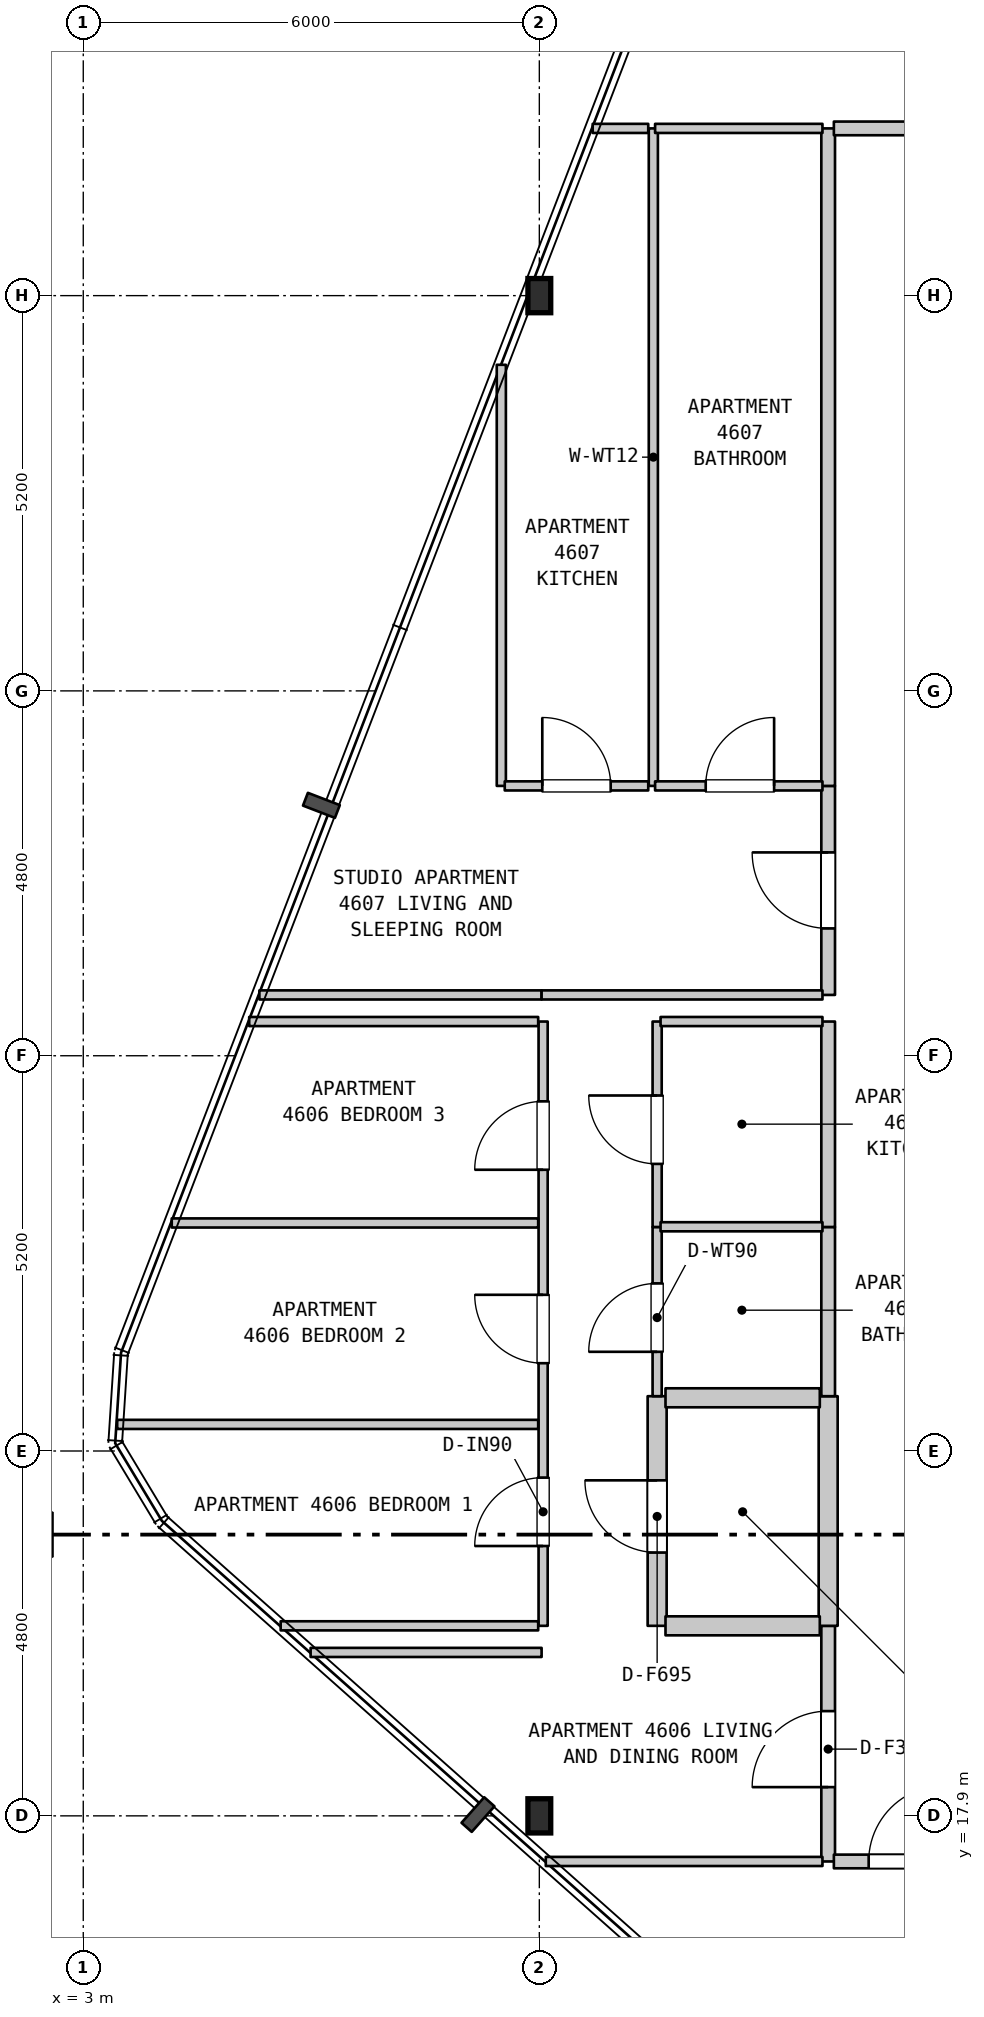
"""IFC4 building model, lengths in metres.
Left out: names, types, materials, properties, quantities, classifications, styles, units other than length and angle.
Written with IfcOpenShell. Run it as: python <this file> out.ifc"""

import sys

from ifc_helpers import new_model, si_unit, direction, frame, frame_2d, origin, origin_2d, place, context, subcontext, project, spatial, rectangle, i_section, extrude, element, fill, save


model = new_model("IFC4")
c1 = context("Model", 3, precision=1e-05, world=origin(), true_north=direction((0.0, 1.0)))
c2 = subcontext(c1, "Body", "Model", "MODEL_VIEW")
j1 = project(units=[si_unit("LENGTHUNIT", "METRE"), si_unit("PLANEANGLEUNIT", "RADIAN")], contexts=[c1])
p1 = place(None, origin())
s1 = spatial("IfcSite", under=j1, at=p1, CompositionType="ELEMENT")
p2 = place(p1, origin())
s2 = spatial("IfcBuilding", under=s1, at=p2, CompositionType="ELEMENT")
p3 = place(p2, frame((0.0, 0.0, 188.4)))
s3 = spatial("IfcBuildingStorey", under=s2, at=p3, CompositionType="ELEMENT", Elevation=188.4)
for number, where, z_axis, x_axis in (
    (1, (9.0, 17.9, 0.0), (0.0, 0.0, 1.0), (1.0, 0.0, 0.0)),
    (2, (9.0, 37.9, 0.0), (0.0, 0.0, 1.0), (1.0, 0.0, 0.0)),
):
    element("IfcColumn", number, at=place(p3, frame(where, z_axis=z_axis, x_axis=x_axis)), inside=s3, PredefinedType="COLUMN", context=c2, shape_type="SweptSolid", body=[
        extrude(i_section(OverallWidth=0.3, OverallDepth=0.45, WebThickness=0.014, FlangeThickness=0.026, FilletRadius=0.027, at=origin_2d()), origin(), (0.0, 0.0, 1.0), 3.7),
    ])
p4 = place(p3, frame((8.5, 31.45, 0.0), z_axis=(0.0, 0.0, 1.0), x_axis=(0.0, 1.0, 0.0)))
e3 = element("IfcWall", 3, at=p4, inside=s3, PredefinedType="PARTITIONING", context=c2, shape_type="SweptSolid", body=[
    extrude(rectangle(XDim=5.54, YDim=0.12, at=frame_2d((2.77, 0.0))), origin(), (0.0, 0.0, 1.0), 3.39),
])
p5 = place(p3, frame((9.05, 20.4, 0.0), z_axis=(0.0, 0.0, 1.0), x_axis=(0.0, 1.0, 0.0)))
e4 = element("IfcWall", 4, at=p5, inside=s3, PredefinedType="PARTITIONING", context=c2, shape_type="SweptSolid", body=[
    extrude(rectangle(XDim=7.95, YDim=0.12, at=frame_2d((3.975, 0.0))), origin(), (0.0, 0.0, 1.0), 2.79),
])
p6 = place(p5, frame((1.05, 0.0, 0.0)))
e5 = element("IfcOpeningElement", 5, at=p6, cuts=e4, PredefinedType="OPENING", context=c2, shape_type="SweptSolid", body=[
    extrude(rectangle(XDim=0.9, YDim=2.15, at=frame_2d((0.45, 1.075))), frame((0.0, 0.07, 0.0), z_axis=(0.0, -1.0, 0.0), x_axis=(1.0, 0.0, 0.0)), (0.0, 0.0, 1.0), 0.14),
])
p7 = place(p5, frame((3.455, 0.0, 0.0)))
e6 = element("IfcOpeningElement", 6, at=p7, cuts=e4, PredefinedType="OPENING", context=c2, shape_type="SweptSolid", body=[
    extrude(rectangle(XDim=0.9, YDim=2.15, at=frame_2d((0.45, 1.075))), frame((0.0, 0.07, 0.0), z_axis=(0.0, -1.0, 0.0), x_axis=(1.0, 0.0, 0.0)), (0.0, 0.0, 1.0), 0.14),
])
p8 = place(p5, frame((6.0, 0.0, 0.0)))
e7 = element("IfcOpeningElement", 7, at=p8, cuts=e4, PredefinedType="OPENING", context=c2, shape_type="SweptSolid", body=[
    extrude(rectangle(XDim=0.9, YDim=2.15, at=frame_2d((0.45, 1.075))), frame((0.0, 0.07, 0.0), z_axis=(0.0, -1.0, 0.0), x_axis=(1.0, 0.0, 0.0)), (0.0, 0.0, 1.0), 0.14),
])
p9 = place(p3, frame((10.5, 31.45, 0.0), z_axis=(0.0, 0.0, 1.0), x_axis=(0.0, 1.0, 0.0)))
e8 = element("IfcWall", 8, at=p9, inside=s3, PredefinedType="PARTITIONING", context=c2, shape_type="SweptSolid", body=[
    extrude(rectangle(XDim=8.65, YDim=0.12, at=frame_2d((4.325, 0.0))), origin(), (0.0, 0.0, 1.0), 3.39),
])
p10 = place(p3, frame((10.55, 20.4, 0.0), z_axis=(0.0, 0.0, 1.0), x_axis=(0.0, 1.0, 0.0)))
e9 = element("IfcWall", 9, at=p10, inside=s3, PredefinedType="STANDARD", context=c2, shape_type="SweptSolid", body=[
    extrude(rectangle(XDim=3.021, YDim=0.25, at=frame_2d((1.51, 0.0))), origin(), (0.0, 0.0, 1.0), 3.39),
])
p11 = place(p10, frame((0.964, 0.0, 0.0)))
e10 = element("IfcOpeningElement", 10, at=p11, cuts=e9, PredefinedType="OPENING", context=c2, shape_type="SweptSolid", body=[
    extrude(rectangle(XDim=0.95, YDim=2.15, at=frame_2d((0.475, 1.075))), frame((0.0, 0.135, 0.0), z_axis=(0.0, -1.0, 0.0), x_axis=(1.0, 0.0, 0.0)), (0.0, 0.0, 1.0), 0.27),
])
p12 = place(p3, frame((10.55, 23.421, 0.0), z_axis=(0.0, 0.0, 1.0), x_axis=(0.0, 1.0, 0.0)))
e11 = element("IfcWall", 11, at=p12, inside=s3, PredefinedType="PARTITIONING", context=c2, shape_type="SweptSolid", body=[
    extrude(rectangle(XDim=2.226, YDim=0.12, at=frame_2d((1.113, 0.0))), origin(), (0.0, 0.0, 1.0), 3.39),
])
p13 = place(p12, frame((0.584, 0.0, 0.0)))
e12 = element("IfcOpeningElement", 12, at=p13, cuts=e11, PredefinedType="OPENING", context=c2, shape_type="SweptSolid", body=[
    extrude(rectangle(XDim=0.9, YDim=2.1, at=frame_2d((0.45, 1.05))), frame((0.0, 0.07, 0.0), z_axis=(0.0, -1.0, 0.0), x_axis=(1.0, 0.0, 0.0)), (0.0, 0.0, 1.0), 0.14),
])
p14 = place(p3, frame((10.55, 25.647, 0.0), z_axis=(0.0, 0.0, 1.0), x_axis=(0.0, 1.0, 0.0)))
e13 = element("IfcWall", 13, at=p14, inside=s3, PredefinedType="PARTITIONING", context=c2, shape_type="SweptSolid", body=[
    extrude(rectangle(XDim=2.703, YDim=0.12, at=frame_2d((1.352, 0.0))), origin(), (0.0, 0.0, 1.0), 3.39),
])
p15 = place(p14, frame((0.83, 0.0, 0.0)))
e14 = element("IfcOpeningElement", 14, at=p15, cuts=e13, PredefinedType="OPENING", context=c2, shape_type="SweptSolid", body=[
    extrude(rectangle(XDim=0.9, YDim=2.15, at=frame_2d((0.45, 1.075))), frame((0.0, 0.07, 0.0), z_axis=(0.0, -1.0, 0.0), x_axis=(1.0, 0.0, 0.0)), (0.0, 0.0, 1.0), 0.14),
])
p16 = place(p3, frame((12.8, 17.3, 0.0), z_axis=(0.0, 0.0, 1.0), x_axis=(0.0, 1.0, 0.0)))
e15 = element("IfcWall", 15, at=p16, inside=s3, PredefinedType="STANDARD", context=c2, shape_type="SweptSolid", body=[
    extrude(rectangle(XDim=3.1, YDim=0.18, at=frame_2d((1.55, 0.0))), origin(), (0.0, 0.0, 1.0), 3.39),
])
p17 = place(p16, frame((0.978, 0.0, 0.0)))
e16 = element("IfcOpeningElement", 16, at=p17, cuts=e15, PredefinedType="OPENING", context=c2, shape_type="SweptSolid", body=[
    extrude(rectangle(XDim=1.0, YDim=2.15, at=frame_2d((0.5, 1.075))), frame((0.0, 0.1, 0.0), z_axis=(0.0, -1.0, 0.0), x_axis=(1.0, 0.0, 0.0)), (0.0, 0.0, 1.0), 0.2),
])
p18 = place(p3, frame((12.8, 20.4, 0.0), z_axis=(0.0, 0.0, 1.0), x_axis=(0.0, 1.0, 0.0)))
e17 = element("IfcWall", 17, at=p18, inside=s3, PredefinedType="STANDARD", context=c2, shape_type="SweptSolid", body=[
    extrude(rectangle(XDim=3.021, YDim=0.25, at=frame_2d((1.51, 0.0))), origin(), (0.0, 0.0, 1.0), 3.39),
])
p19 = place(p3, frame((12.8, 23.421, 0.0), z_axis=(0.0, 0.0, 1.0), x_axis=(0.0, 1.0, 0.0)))
e18 = element("IfcWall", 18, at=p19, inside=s3, PredefinedType="STANDARD", context=c2, shape_type="SweptSolid", body=[
    extrude(rectangle(XDim=2.226, YDim=0.18, at=frame_2d((1.113, 0.0))), origin(), (0.0, 0.0, 1.0), 3.39),
])
p20 = place(p3, frame((12.8, 25.647, 0.0), z_axis=(0.0, 0.0, 1.0), x_axis=(0.0, 1.0, 0.0)))
e19 = element("IfcWall", 19, at=p20, inside=s3, PredefinedType="STANDARD", context=c2, shape_type="SweptSolid", body=[
    extrude(rectangle(XDim=2.703, YDim=0.18, at=frame_2d((1.352, 0.0))), origin(), (0.0, 0.0, 1.0), 3.39),
])
p21 = place(p3, frame((12.8, 28.7, 0.0), z_axis=(0.0, 0.0, 1.0), x_axis=(0.0, 1.0, 0.0)))
e20 = element("IfcWall", 20, at=p21, inside=s3, PredefinedType="STANDARD", context=c2, shape_type="SweptSolid", body=[
    extrude(rectangle(XDim=2.75, YDim=0.18, at=frame_2d((1.375, 0.0))), origin(), (0.0, 0.0, 1.0), 3.39),
])
p22 = place(p21, frame((0.875, 0.0, 0.0)))
e21 = element("IfcOpeningElement", 21, at=p22, cuts=e20, PredefinedType="OPENING", context=c2, shape_type="SweptSolid", body=[
    extrude(rectangle(XDim=1.0, YDim=2.15, at=frame_2d((0.5, 1.075))), frame((0.0, 0.1, 0.0), z_axis=(0.0, -1.0, 0.0), x_axis=(1.0, 0.0, 0.0)), (0.0, 0.0, 1.0), 0.2),
])
p23 = place(p3, frame((12.8, 31.45, 0.0), z_axis=(0.0, 0.0, 1.0), x_axis=(0.0, 1.0, 0.0)))
e22 = element("IfcWall", 22, at=p23, inside=s3, PredefinedType="STANDARD", context=c2, shape_type="SweptSolid", body=[
    extrude(rectangle(XDim=8.65, YDim=0.18, at=frame_2d((4.325, 0.0))), origin(), (0.0, 0.0, 1.0), 3.39),
])
p24 = place(p3, frame((9.085, 17.3, 0.0), z_axis=(0.0, 0.0, 1.0), x_axis=(1.0, 0.0, 0.0)))
e23 = element("IfcWall", 23, at=p24, inside=s3, PredefinedType="PARTITIONING", context=c2, shape_type="SweptSolid", body=[
    extrude(rectangle(XDim=3.64, YDim=0.12, at=frame_2d((1.82, 0.0))), origin(), (0.0, 0.0, 1.0), 3.39),
])
p25 = place(p3, frame((12.875, 17.3, 0.0), z_axis=(0.0, 0.0, 1.0), x_axis=(1.0, 0.0, 0.0)))
e24 = element("IfcWall", 24, at=p25, inside=s3, PredefinedType="STANDARD", context=c2, shape_type="SweptSolid", body=[
    extrude(rectangle(XDim=3.78, YDim=0.18, at=frame_2d((1.89, 0.0))), origin(), (0.0, 0.0, 1.0), 3.39),
])
p26 = place(p25, frame((0.458, 0.0, 0.0)))
e25 = element("IfcOpeningElement", 25, at=p26, cuts=e24, PredefinedType="OPENING", context=c2, shape_type="SweptSolid", body=[
    extrude(rectangle(XDim=1.0, YDim=2.15, at=frame_2d((0.5, 1.075))), frame((0.0, 0.1, 0.0), z_axis=(0.0, -1.0, 0.0), x_axis=(1.0, 0.0, 0.0)), (0.0, 0.0, 1.0), 0.2),
])
p27 = place(p3, frame((5.991, 20.05, 0.0), z_axis=(0.0, 0.0, 1.0), x_axis=(1.0, 0.0, 0.0)))
e26 = element("IfcWall", 26, at=p27, inside=s3, PredefinedType="PARTITIONING", context=c2, shape_type="SweptSolid", body=[
    extrude(rectangle(XDim=3.039, YDim=0.12, at=frame_2d((1.52, 0.0))), origin(), (0.0, 0.0, 1.0), 3.39),
])
p28 = place(p3, frame((5.597, 20.4, 0.0), z_axis=(0.0, 0.0, 1.0), x_axis=(1.0, 0.0, 0.0)))
e27 = element("IfcWall", 27, at=p28, inside=s3, PredefinedType="PARTITIONING", context=c2, shape_type="SweptSolid", body=[
    extrude(rectangle(XDim=3.388, YDim=0.12, at=frame_2d((1.694, 0.0))), origin(), (0.0, 0.0, 1.0), 3.39),
])
p29 = place(p3, frame((10.66, 20.4, 0.0), z_axis=(0.0, 0.0, 1.0), x_axis=(1.0, 0.0, 0.0)))
e28 = element("IfcWall", 28, at=p29, inside=s3, PredefinedType="STANDARD", context=c2, shape_type="SweptSolid", body=[
    extrude(rectangle(XDim=2.03, YDim=0.25, at=frame_2d((1.015, 0.0))), origin(), (0.0, 0.0, 1.0), 3.39),
])
p30 = place(p3, frame((3.446, 23.05, 0.0), z_axis=(0.0, 0.0, 1.0), x_axis=(1.0, 0.0, 0.0)))
e29 = element("IfcWall", 29, at=p30, inside=s3, PredefinedType="PARTITIONING", context=c2, shape_type="SweptSolid", body=[
    extrude(rectangle(XDim=5.539, YDim=0.12, at=frame_2d((2.77, 0.0))), origin(), (0.0, 0.0, 1.0), 3.39),
])
p31 = place(p3, frame((10.66, 23.4, 0.0), z_axis=(0.0, 0.0, 1.0), x_axis=(1.0, 0.0, 0.0)))
e30 = element("IfcWall", 30, at=p31, inside=s3, PredefinedType="STANDARD", context=c2, shape_type="SweptSolid", body=[
    extrude(rectangle(XDim=2.03, YDim=0.25, at=frame_2d((1.015, 0.0))), origin(), (0.0, 0.0, 1.0), 3.39),
])
p32 = place(p3, frame((10.595, 25.65, 0.0), z_axis=(0.0, 0.0, 1.0), x_axis=(1.0, 0.0, 0.0)))
e31 = element("IfcWall", 31, at=p32, inside=s3, PredefinedType="PARTITIONING", context=c2, shape_type="SweptSolid", body=[
    extrude(rectangle(XDim=2.13, YDim=0.12, at=frame_2d((1.065, 0.0))), origin(), (0.0, 0.0, 1.0), 3.39),
])
p33 = place(p3, frame((4.164, 25.7, 0.0), z_axis=(0.0, 0.0, 1.0), x_axis=(1.0, 0.0, 0.0)))
e32 = element("IfcWall", 32, at=p33, inside=s3, PredefinedType="PARTITIONING", context=c2, shape_type="SweptSolid", body=[
    extrude(rectangle(XDim=4.821, YDim=0.12, at=frame_2d((2.411, 0.0))), origin(), (0.0, 0.0, 1.0), 3.39),
])
p34 = place(p3, frame((5.183, 28.35, 0.0), z_axis=(0.0, 0.0, 1.0), x_axis=(1.0, 0.0, 0.0)))
e33 = element("IfcWall", 33, at=p34, inside=s3, PredefinedType="PARTITIONING", context=c2, shape_type="SweptSolid", body=[
    extrude(rectangle(XDim=3.802, YDim=0.12, at=frame_2d((1.901, 0.0))), origin(), (0.0, 0.0, 1.0), 3.39),
])
p35 = place(p3, frame((10.595, 28.35, 0.0), z_axis=(0.0, 0.0, 1.0), x_axis=(1.0, 0.0, 0.0)))
e34 = element("IfcWall", 34, at=p35, inside=s3, PredefinedType="PARTITIONING", context=c2, shape_type="SweptSolid", body=[
    extrude(rectangle(XDim=2.13, YDim=0.12, at=frame_2d((1.065, 0.0))), origin(), (0.0, 0.0, 1.0), 3.39),
])
p36 = place(p3, frame((5.317, 28.7, 0.0), z_axis=(0.0, 0.0, 1.0), x_axis=(1.0, 0.0, 0.0)))
e35 = element("IfcWall", 35, at=p36, inside=s3, PredefinedType="PARTITIONING", context=c2, shape_type="SweptSolid", body=[
    extrude(rectangle(XDim=3.713, YDim=0.12, at=frame_2d((1.856, 0.0))), origin(), (0.0, 0.0, 1.0), 3.39),
])
p37 = place(p3, frame((9.03, 28.7, 0.0), z_axis=(0.0, 0.0, 1.0), x_axis=(1.0, 0.0, 0.0)))
e36 = element("IfcWall", 36, at=p37, inside=s3, PredefinedType="PARTITIONING", context=c2, shape_type="SweptSolid", body=[
    extrude(rectangle(XDim=3.695, YDim=0.12, at=frame_2d((1.848, 0.0))), origin(), (0.0, 0.0, 1.0), 3.39),
])
p38 = place(p3, frame((8.545, 31.45, 0.0), z_axis=(0.0, 0.0, 1.0), x_axis=(1.0, 0.0, 0.0)))
e37 = element("IfcWall", 37, at=p38, inside=s3, PredefinedType="PARTITIONING", context=c2, shape_type="SweptSolid", body=[
    extrude(rectangle(XDim=1.888, YDim=0.12, at=frame_2d((0.944, 0.0))), origin(), (0.0, 0.0, 1.0), 3.39),
])
p39 = place(p38, frame((0.494, 0.0, 0.0)))
e38 = element("IfcOpeningElement", 38, at=p39, cuts=e37, PredefinedType="OPENING", context=c2, shape_type="SweptSolid", body=[
    extrude(rectangle(XDim=0.9, YDim=2.15, at=frame_2d((0.45, 1.075))), frame((0.0, 0.07, 0.0), z_axis=(0.0, -1.0, 0.0), x_axis=(1.0, 0.0, 0.0)), (0.0, 0.0, 1.0), 0.14),
])
p40 = place(p3, frame((10.523, 31.45, 0.0), z_axis=(0.0, 0.0, 1.0), x_axis=(1.0, 0.0, 0.0)))
e39 = element("IfcWall", 39, at=p40, inside=s3, PredefinedType="PARTITIONING", context=c2, shape_type="SweptSolid", body=[
    extrude(rectangle(XDim=2.202, YDim=0.12, at=frame_2d((1.101, 0.0))), origin(), (0.0, 0.0, 1.0), 3.39),
])
p41 = place(p40, frame((0.666, 0.0, 0.0)))
e40 = element("IfcOpeningElement", 40, at=p41, cuts=e39, PredefinedType="OPENING", context=c2, shape_type="SweptSolid", body=[
    extrude(rectangle(XDim=0.9, YDim=2.1, at=frame_2d((0.45, 1.05))), frame((0.0, 0.07, 0.0), z_axis=(0.0, -1.0, 0.0), x_axis=(1.0, 0.0, 0.0)), (0.0, 0.0, 1.0), 0.14),
])
p42 = place(p3, frame((9.702, 40.1, 0.0), z_axis=(0.0, 0.0, 1.0), x_axis=(1.0, 0.0, 0.0)))
e41 = element("IfcWall", 41, at=p42, inside=s3, PredefinedType="PARTITIONING", context=c2, shape_type="SweptSolid", body=[
    extrude(rectangle(XDim=0.731, YDim=0.12, at=frame_2d((0.366, 0.0))), origin(), (0.0, 0.0, 1.0), 3.39),
])
p43 = place(p3, frame((10.523, 40.1, 0.0), z_axis=(0.0, 0.0, 1.0), x_axis=(1.0, 0.0, 0.0)))
e42 = element("IfcWall", 42, at=p43, inside=s3, PredefinedType="PARTITIONING", context=c2, shape_type="SweptSolid", body=[
    extrude(rectangle(XDim=2.202, YDim=0.12, at=frame_2d((1.101, 0.0))), origin(), (0.0, 0.0, 1.0), 3.39),
])
p44 = place(p3, frame((12.875, 40.1, 0.0), z_axis=(0.0, 0.0, 1.0), x_axis=(1.0, 0.0, 0.0)))
e43 = element("IfcWall", 43, at=p44, inside=s3, PredefinedType="STANDARD", context=c2, shape_type="SweptSolid", body=[
    extrude(rectangle(XDim=1.48, YDim=0.18, at=frame_2d((0.74, 0.0))), origin(), (0.0, 0.0, 1.0), 3.39),
])
p45 = place(p6, origin())
e44 = element("IfcDoor", 44, at=p45, inside=s3, OperationType="SINGLE_SWING_LEFT", PredefinedType="DOOR", context=c2, shape_type="SweptSolid", body=[
    extrude(rectangle(XDim=0.9, YDim=2.15, at=frame_2d((0.45, 1.075))), frame((0.0, 0.025, 0.0), z_axis=(0.0, -1.0, 0.0), x_axis=(1.0, 0.0, 0.0)), (0.0, 0.0, 1.0), 0.05),
])
fill(e5, e44)
p46 = place(p7, origin())
e45 = element("IfcDoor", 45, at=p46, inside=s3, OperationType="SINGLE_SWING_RIGHT", PredefinedType="DOOR", context=c2, shape_type="SweptSolid", body=[
    extrude(rectangle(XDim=0.9, YDim=2.15, at=frame_2d((0.45, 1.075))), frame((0.0, 0.025, 0.0), z_axis=(0.0, -1.0, 0.0), x_axis=(1.0, 0.0, 0.0)), (0.0, 0.0, 1.0), 0.05),
])
fill(e6, e45)
p47 = place(p8, origin())
e46 = element("IfcDoor", 46, at=p47, inside=s3, OperationType="SINGLE_SWING_LEFT", PredefinedType="DOOR", context=c2, shape_type="SweptSolid", body=[
    extrude(rectangle(XDim=0.9, YDim=2.15, at=frame_2d((0.45, 1.075))), frame((0.0, 0.025, 0.0), z_axis=(0.0, -1.0, 0.0), x_axis=(1.0, 0.0, 0.0)), (0.0, 0.0, 1.0), 0.05),
])
fill(e7, e46)
p48 = place(p11, origin())
e47 = element("IfcDoor", 47, at=p48, inside=s3, OperationType="SINGLE_SWING_RIGHT", PredefinedType="DOOR", context=c2, shape_type="SweptSolid", body=[
    extrude(rectangle(XDim=0.95, YDim=2.15, at=frame_2d((0.475, 1.075))), frame((0.0, 0.025, 0.0), z_axis=(0.0, -1.0, 0.0), x_axis=(1.0, 0.0, 0.0)), (0.0, 0.0, 1.0), 0.05),
])
fill(e10, e47)
p49 = place(p13, origin())
e48 = element("IfcDoor", 48, at=p49, inside=s3, OperationType="SINGLE_SWING_LEFT", PredefinedType="DOOR", context=c2, shape_type="SweptSolid", body=[
    extrude(rectangle(XDim=0.9, YDim=2.1, at=frame_2d((0.45, 1.05))), frame((0.0, 0.025, 0.0), z_axis=(0.0, -1.0, 0.0), x_axis=(1.0, 0.0, 0.0)), (0.0, 0.0, 1.0), 0.05),
])
fill(e12, e48)
p50 = place(p15, origin())
e49 = element("IfcDoor", 49, at=p50, inside=s3, OperationType="SINGLE_SWING_RIGHT", PredefinedType="DOOR", context=c2, shape_type="SweptSolid", body=[
    extrude(rectangle(XDim=0.9, YDim=2.15, at=frame_2d((0.45, 1.075))), frame((0.0, 0.025, 0.0), z_axis=(0.0, -1.0, 0.0), x_axis=(1.0, 0.0, 0.0)), (0.0, 0.0, 1.0), 0.05),
])
fill(e14, e49)
p51 = place(p17, origin())
e50 = element("IfcDoor", 50, at=p51, inside=s3, OperationType="SINGLE_SWING_LEFT", PredefinedType="DOOR", context=c2, shape_type="SweptSolid", body=[
    extrude(rectangle(XDim=1.0, YDim=2.15, at=frame_2d((0.5, 1.075))), frame((0.0, 0.025, 0.0), z_axis=(0.0, -1.0, 0.0), x_axis=(1.0, 0.0, 0.0)), (0.0, 0.0, 1.0), 0.05),
])
fill(e16, e50)
p52 = place(p22, origin())
e51 = element("IfcDoor", 51, at=p52, inside=s3, OperationType="SINGLE_SWING_RIGHT", PredefinedType="DOOR", context=c2, shape_type="SweptSolid", body=[
    extrude(rectangle(XDim=1.0, YDim=2.15, at=frame_2d((0.5, 1.075))), frame((0.0, 0.025, 0.0), z_axis=(0.0, -1.0, 0.0), x_axis=(1.0, 0.0, 0.0)), (0.0, 0.0, 1.0), 0.05),
])
fill(e21, e51)
p53 = place(p26, origin())
e52 = element("IfcDoor", 52, at=p53, inside=s3, OperationType="SINGLE_SWING_RIGHT", PredefinedType="DOOR", context=c2, shape_type="SweptSolid", body=[
    extrude(rectangle(XDim=1.0, YDim=2.15, at=frame_2d((0.5, 1.075))), frame((0.0, 0.025, 0.0), z_axis=(0.0, -1.0, 0.0), x_axis=(1.0, 0.0, 0.0)), (0.0, 0.0, 1.0), 0.05),
])
fill(e25, e52)
p54 = place(p39, origin())
e53 = element("IfcDoor", 53, at=p54, inside=s3, OperationType="SINGLE_SWING_LEFT", PredefinedType="DOOR", context=c2, shape_type="SweptSolid", body=[
    extrude(rectangle(XDim=0.9, YDim=2.15, at=frame_2d((0.45, 1.075))), frame((0.0, 0.025, 0.0), z_axis=(0.0, -1.0, 0.0), x_axis=(1.0, 0.0, 0.0)), (0.0, 0.0, 1.0), 0.05),
])
fill(e38, e53)
p55 = place(p41, origin())
e54 = element("IfcDoor", 54, at=p55, inside=s3, OperationType="SINGLE_SWING_RIGHT", PredefinedType="DOOR", context=c2, shape_type="SweptSolid", body=[
    extrude(rectangle(XDim=0.9, YDim=2.1, at=frame_2d((0.45, 1.05))), frame((0.0, 0.025, 0.0), z_axis=(0.0, -1.0, 0.0), x_axis=(1.0, 0.0, 0.0)), (0.0, 0.0, 1.0), 0.05),
])
fill(e40, e54)
save(model, sys.argv[1])
